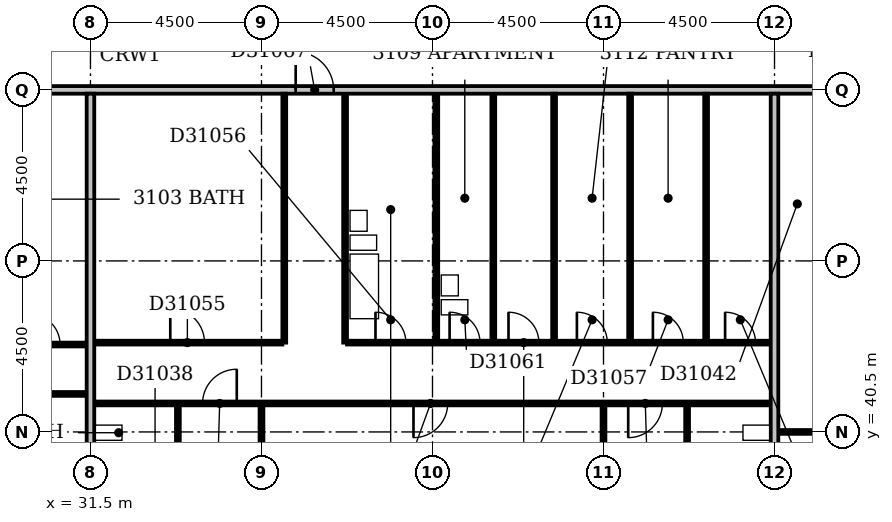
"""IFC4 building model, lengths in metres.
Left out: names, types, materials, properties, quantities, classifications, styles, units other than length and angle.
Written with IfcOpenShell. Run it as: python <this file> out.ifc"""

import sys

from ifc_helpers import new_model, si_unit, direction, frame, frame_2d, origin, place, context, subcontext, project, spatial, rectangle, extrude, element, fill, save


model = new_model("IFC4")
c1 = context("Model", 3, precision=1e-05, world=origin(), true_north=direction((0.0, 1.0)))
c2 = subcontext(c1, "Body", "Model", "MODEL_VIEW")
j1 = project(units=[si_unit("LENGTHUNIT", "METRE"), si_unit("PLANEANGLEUNIT", "RADIAN")], contexts=[c1])
p1 = place(None, origin())
s1 = spatial("IfcSite", under=j1, at=p1, CompositionType="ELEMENT")
p2 = place(p1, origin())
s2 = spatial("IfcBuilding", under=s1, at=p2, CompositionType="ELEMENT")
p3 = place(p2, frame((0.0, 0.0, 126.8)))
s3 = spatial("IfcBuildingStorey", under=s2, at=p3, CompositionType="ELEMENT", Elevation=126.8)
p4 = place(p3, frame((31.5, 36.5, 0.0), z_axis=(0.0, 0.0, 1.0), x_axis=(0.0, 1.0, 0.0)))
e1 = element("IfcWall", 1, at=p4, inside=s3, PredefinedType="PARTITIONING", context=c2, shape_type="SweptSolid", body=[
    extrude(rectangle(XDim=12.9, YDim=0.2, at=frame_2d((6.45, 0.0))), origin(), (0.0, 0.0, 1.0), 3.3),
])
p5 = place(p3, frame((36.0, 36.5, 0.0), z_axis=(0.0, 0.0, 1.0), x_axis=(0.0, 1.0, 0.0)))
e2 = element("IfcWall", 2, at=p5, inside=s3, PredefinedType="PARTITIONING", context=c2, shape_type="SweptSolid", body=[
    extrude(rectangle(XDim=4.7, YDim=0.1, at=frame_2d((2.35, 0.0))), origin(), (0.0, 0.0, 1.0), 2.4),
])
p6 = place(p3, frame((45.0, 36.5, 0.0), z_axis=(0.0, 0.0, 1.0), x_axis=(0.0, 1.0, 0.0)))
e3 = element("IfcWall", 3, at=p6, inside=s3, PredefinedType="PARTITIONING", context=c2, shape_type="SweptSolid", body=[
    extrude(rectangle(XDim=4.7, YDim=0.1, at=frame_2d((2.35, 0.0))), origin(), (0.0, 0.0, 1.0), 2.6),
])
p7 = place(p3, frame((49.5, 36.5, 0.0), z_axis=(0.0, 0.0, 1.0), x_axis=(0.0, 1.0, 0.0)))
e4 = element("IfcWall", 4, at=p7, inside=s3, PredefinedType="PARTITIONING", context=c2, shape_type="SweptSolid", body=[
    extrude(rectangle(XDim=12.9, YDim=0.2, at=frame_2d((6.45, 0.0))), origin(), (0.0, 0.0, 1.0), 3.3),
])
p8 = place(p3, frame((33.8, 38.35, 0.0), z_axis=(0.0, 0.0, 1.0), x_axis=(0.0, 1.0, 0.0)))
e5 = element("IfcWall", 5, at=p8, inside=s3, PredefinedType="PLUMBINGWALL", context=c2, shape_type="SweptSolid", body=[
    extrude(rectangle(XDim=2.85, YDim=0.1, at=frame_2d((1.425, 0.0))), origin(), (0.0, 0.0, 1.0), 3.3),
])
p9 = place(p8, frame((1.05, 0.0, 0.0)))
e6 = element("IfcOpeningElement", 6, at=p9, cuts=e5, PredefinedType="OPENING", context=c2, shape_type="SweptSolid", body=[
    extrude(rectangle(XDim=0.8, YDim=2.1, at=frame_2d((0.4, 1.05))), frame((0.0, 0.062, 0.0), z_axis=(0.0, -1.0, 0.0), x_axis=(1.0, 0.0, 0.0)), (0.0, 0.0, 1.0), 0.124),
])
p10 = place(p3, frame((47.2, 38.35, 0.0), z_axis=(0.0, 0.0, 1.0), x_axis=(0.0, 1.0, 0.0)))
e7 = element("IfcWall", 7, at=p10, inside=s3, PredefinedType="PLUMBINGWALL", context=c2, shape_type="SweptSolid", body=[
    extrude(rectangle(XDim=2.85, YDim=0.1, at=frame_2d((1.425, 0.0))), origin(), (0.0, 0.0, 1.0), 3.3),
])
p11 = place(p10, frame((1.05, 0.0, 0.0)))
e8 = element("IfcOpeningElement", 8, at=p11, cuts=e7, PredefinedType="OPENING", context=c2, shape_type="SweptSolid", body=[
    extrude(rectangle(XDim=0.8, YDim=2.1, at=frame_2d((0.4, 1.05))), frame((0.0, 0.062, 0.0), z_axis=(0.0, -1.0, 0.0), x_axis=(1.0, 0.0, 0.0)), (0.0, 0.0, 1.0), 0.124),
])
p12 = place(p3, frame((49.6, 40.5, 0.0), z_axis=(0.0, 0.0, 1.0), x_axis=(1.0, 0.0, 0.0)))
e9 = element("IfcWall", 9, at=p12, inside=s3, PredefinedType="PARTITIONING", context=c2, shape_type="SweptSolid", body=[
    extrude(rectangle(XDim=4.3, YDim=0.1, at=frame_2d((2.15, 0.0))), origin(), (0.0, 0.0, 1.0), 3.3),
])
p13 = place(p12, frame((1.7, 0.0, 0.0)))
e10 = element("IfcOpeningElement", 10, at=p13, cuts=e9, PredefinedType="OPENING", context=c2, shape_type="SweptSolid", body=[
    extrude(rectangle(XDim=0.9, YDim=2.1, at=frame_2d((0.45, 1.05))), frame((0.0, 0.062, 0.0), z_axis=(0.0, -1.0, 0.0), x_axis=(1.0, 0.0, 0.0)), (0.0, 0.0, 1.0), 0.124),
])
p14 = place(p3, frame((31.6, 41.25, 0.0), z_axis=(0.0, 0.0, 1.0), x_axis=(1.0, 0.0, 0.0)))
e11 = element("IfcWall", 11, at=p14, inside=s3, PredefinedType="PARTITIONING", context=c2, shape_type="SweptSolid", body=[
    extrude(rectangle(XDim=17.8, YDim=0.1, at=frame_2d((8.9, 0.0))), origin(), (0.0, 0.0, 1.0), 3.3),
])
p15 = place(p14, frame((2.85, 0.0, 0.0)))
e12 = element("IfcOpeningElement", 12, at=p15, cuts=e11, PredefinedType="OPENING", context=c2, shape_type="SweptSolid", body=[
    extrude(rectangle(XDim=0.9, YDim=2.1, at=frame_2d((0.45, 1.05))), frame((0.0, 0.062, 0.0), z_axis=(0.0, -1.0, 0.0), x_axis=(1.0, 0.0, 0.0)), (0.0, 0.0, 1.0), 0.124),
])
p16 = place(p14, frame((8.4, 0.0, 0.0)))
e13 = element("IfcOpeningElement", 13, at=p16, cuts=e11, PredefinedType="OPENING", context=c2, shape_type="SweptSolid", body=[
    extrude(rectangle(XDim=0.9, YDim=2.1, at=frame_2d((0.45, 1.05))), frame((0.0, 0.062, 0.0), z_axis=(0.0, -1.0, 0.0), x_axis=(1.0, 0.0, 0.0)), (0.0, 0.0, 1.0), 0.124),
])
p17 = place(p14, frame((14.05, 0.0, 0.0)))
e14 = element("IfcOpeningElement", 14, at=p17, cuts=e11, PredefinedType="OPENING", context=c2, shape_type="SweptSolid", body=[
    extrude(rectangle(XDim=0.9, YDim=2.1, at=frame_2d((0.45, 1.05))), frame((0.0, 0.062, 0.0), z_axis=(0.0, -1.0, 0.0), x_axis=(1.0, 0.0, 0.0)), (0.0, 0.0, 1.0), 0.124),
])
p18 = place(p3, frame((22.6, 41.5, 0.0), z_axis=(0.0, 0.0, 1.0), x_axis=(1.0, 0.0, 0.0)))
e15 = element("IfcWall", 15, at=p18, inside=s3, PredefinedType="PARTITIONING", context=c2, shape_type="SweptSolid", body=[
    extrude(rectangle(XDim=8.8, YDim=0.1, at=frame_2d((4.4, 0.0))), origin(), (0.0, 0.0, 1.0), 3.3),
])
p19 = place(p18, frame((1.7, 0.0, 0.0)))
e16 = element("IfcOpeningElement", 16, at=p19, cuts=e15, PredefinedType="OPENING", context=c2, shape_type="SweptSolid", body=[
    extrude(rectangle(XDim=0.9, YDim=2.1, at=frame_2d((0.45, 1.05))), frame((0.0, 0.062, 0.0), z_axis=(0.0, -1.0, 0.0), x_axis=(1.0, 0.0, 0.0)), (0.0, 0.0, 1.0), 0.124),
])
p20 = place(p18, frame((6.2, 0.0, 0.0)))
e17 = element("IfcOpeningElement", 17, at=p20, cuts=e15, PredefinedType="OPENING", context=c2, shape_type="SweptSolid", body=[
    extrude(rectangle(XDim=0.9, YDim=2.1, at=frame_2d((0.45, 1.05))), frame((0.0, 0.062, 0.0), z_axis=(0.0, -1.0, 0.0), x_axis=(1.0, 0.0, 0.0)), (0.0, 0.0, 1.0), 0.124),
])
p21 = place(p3, frame((24.15, 42.8, 0.0), z_axis=(0.0, 0.0, 1.0), x_axis=(1.0, 0.0, 0.0)))
e18 = element("IfcWall", 18, at=p21, inside=s3, PredefinedType="PARTITIONING", context=c2, shape_type="SweptSolid", body=[
    extrude(rectangle(XDim=7.25, YDim=0.1, at=frame_2d((3.625, 0.0))), origin(), (0.0, 0.0, 1.0), 3.3),
])
p22 = place(p21, frame((5.75, 0.0, 0.0)))
e19 = element("IfcOpeningElement", 19, at=p22, cuts=e18, PredefinedType="OPENING", context=c2, shape_type="SweptSolid", body=[
    extrude(rectangle(XDim=0.8, YDim=2.1, at=frame_2d((0.4, 1.05))), frame((0.0, 0.062, 0.0), z_axis=(0.0, -1.0, 0.0), x_axis=(1.0, 0.0, 0.0)), (0.0, 0.0, 1.0), 0.124),
])
p23 = place(p21, frame((2.0, 0.0, 0.0)))
e20 = element("IfcOpeningElement", 20, at=p23, cuts=e18, PredefinedType="OPENING", context=c2, shape_type="SweptSolid", body=[
    extrude(rectangle(XDim=0.9, YDim=2.1, at=frame_2d((0.45, 1.05))), frame((0.0, 0.062, 0.0), z_axis=(0.0, -1.0, 0.0), x_axis=(1.0, 0.0, 0.0)), (0.0, 0.0, 1.0), 0.124),
])
p24 = place(p3, frame((31.6, 42.85, 0.0), z_axis=(0.0, 0.0, 1.0), x_axis=(1.0, 0.0, 0.0)))
e21 = element("IfcWall", 21, at=p24, inside=s3, PredefinedType="PARTITIONING", context=c2, shape_type="SweptSolid", body=[
    extrude(rectangle(XDim=4.95, YDim=0.1, at=frame_2d((2.475, 0.0))), origin(), (0.0, 0.0, 1.0), 3.3),
])
p25 = place(p24, frame((2.0, 0.0, 0.0)))
e22 = element("IfcOpeningElement", 22, at=p25, cuts=e21, PredefinedType="OPENING", context=c2, shape_type="SweptSolid", body=[
    extrude(rectangle(XDim=0.9, YDim=2.1, at=frame_2d((0.45, 1.05))), frame((0.0, 0.062, 0.0), z_axis=(0.0, -1.0, 0.0), x_axis=(1.0, 0.0, 0.0)), (0.0, 0.0, 1.0), 0.124),
])
p26 = place(p3, frame((36.6, 42.85, 0.0), z_axis=(0.0, 0.0, 1.0), x_axis=(0.0, 1.0, 0.0)))
e23 = element("IfcWall", 23, at=p26, inside=s3, PredefinedType="PARTITIONING", context=c2, shape_type="SweptSolid", body=[
    extrude(rectangle(XDim=6.55, YDim=0.1, at=frame_2d((3.275, 0.0))), origin(), (0.0, 0.0, 1.0), 2.4),
])
p27 = place(p3, frame((38.2, 42.85, 0.0), z_axis=(0.0, 0.0, 1.0), x_axis=(0.0, 1.0, 0.0)))
e24 = element("IfcWall", 24, at=p27, inside=s3, PredefinedType="PLUMBINGWALL", context=c2, shape_type="SweptSolid", body=[
    extrude(rectangle(XDim=6.55, YDim=0.1, at=frame_2d((3.275, 0.0))), origin(), (0.0, 0.0, 1.0), 3.3),
])
p28 = place(p3, frame((38.25, 42.85, 0.0), z_axis=(0.0, 0.0, 1.0), x_axis=(1.0, 0.0, 0.0)))
e25 = element("IfcWall", 25, at=p28, inside=s3, PredefinedType="PARTITIONING", context=c2, shape_type="SweptSolid", body=[
    extrude(rectangle(XDim=11.15, YDim=0.1, at=frame_2d((5.575, 0.0))), origin(), (0.0, 0.0, 1.0), 3.3),
])
p29 = place(p28, frame((0.75, 0.0, 0.0)))
e26 = element("IfcOpeningElement", 26, at=p29, cuts=e25, PredefinedType="OPENING", context=c2, shape_type="SweptSolid", body=[
    extrude(rectangle(XDim=0.8, YDim=2.1, at=frame_2d((0.4, 1.05))), frame((0.0, 0.062, 0.0), z_axis=(0.0, -1.0, 0.0), x_axis=(1.0, 0.0, 0.0)), (0.0, 0.0, 1.0), 0.124),
])
p30 = place(p28, frame((8.05, 0.0, 0.0)))
e27 = element("IfcOpeningElement", 27, at=p30, cuts=e25, PredefinedType="OPENING", context=c2, shape_type="SweptSolid", body=[
    extrude(rectangle(XDim=0.8, YDim=2.1, at=frame_2d((0.4, 1.05))), frame((0.0, 0.062, 0.0), z_axis=(0.0, -1.0, 0.0), x_axis=(1.0, 0.0, 0.0)), (0.0, 0.0, 1.0), 0.124),
])
p31 = place(p28, frame((4.25, 0.0, 0.0)))
e28 = element("IfcOpeningElement", 28, at=p31, cuts=e25, PredefinedType="OPENING", context=c2, shape_type="SweptSolid", body=[
    extrude(rectangle(XDim=0.8, YDim=2.1, at=frame_2d((0.4, 1.05))), frame((0.0, 0.062, 0.0), z_axis=(0.0, -1.0, 0.0), x_axis=(1.0, 0.0, 0.0)), (0.0, 0.0, 1.0), 0.124),
])
p32 = place(p28, frame((6.05, 0.0, 0.0)))
e29 = element("IfcOpeningElement", 29, at=p32, cuts=e25, PredefinedType="OPENING", context=c2, shape_type="SweptSolid", body=[
    extrude(rectangle(XDim=0.8, YDim=2.1, at=frame_2d((0.4, 1.05))), frame((0.0, 0.062, 0.0), z_axis=(0.0, -1.0, 0.0), x_axis=(1.0, 0.0, 0.0)), (0.0, 0.0, 1.0), 0.124),
])
p33 = place(p28, frame((9.95, 0.0, 0.0)))
e30 = element("IfcOpeningElement", 30, at=p33, cuts=e25, PredefinedType="OPENING", context=c2, shape_type="SweptSolid", body=[
    extrude(rectangle(XDim=0.8, YDim=2.1, at=frame_2d((0.4, 1.05))), frame((0.0, 0.062, 0.0), z_axis=(0.0, -1.0, 0.0), x_axis=(1.0, 0.0, 0.0)), (0.0, 0.0, 1.0), 0.124),
])
p34 = place(p28, frame((2.7, 0.0, 0.0)))
e31 = element("IfcOpeningElement", 31, at=p34, cuts=e25, PredefinedType="OPENING", context=c2, shape_type="SweptSolid", body=[
    extrude(rectangle(XDim=0.8, YDim=2.1, at=frame_2d((0.4, 1.05))), frame((0.0, 0.062, 0.0), z_axis=(0.0, -1.0, 0.0), x_axis=(1.0, 0.0, 0.0)), (0.0, 0.0, 1.0), 0.124),
])
for number, where, z_axis, x_axis in (
    (32, (40.6, 42.9, 0.0), (0.0, 0.0, 1.0), (0.0, 1.0, 0.0)),
    (33, (42.1, 42.9, 0.0), (0.0, 0.0, 1.0), (0.0, 1.0, 0.0)),
):
    element("IfcWall", number, at=place(p3, frame(where, z_axis=z_axis, x_axis=x_axis)), inside=s3, PredefinedType="PLUMBINGWALL", context=c2, shape_type="SweptSolid", body=[
        extrude(rectangle(XDim=6.5, YDim=0.1, at=frame_2d((3.25, 0.0))), origin(), (0.0, 0.0, 1.0), 3.3),
    ])
p35 = place(p3, frame((43.7, 42.9, 0.0), z_axis=(0.0, 0.0, 1.0), x_axis=(0.0, 1.0, 0.0)))
e34 = element("IfcWall", 34, at=p35, inside=s3, PredefinedType="PARTITIONING", context=c2, shape_type="SweptSolid", body=[
    extrude(rectangle(XDim=6.5, YDim=0.1, at=frame_2d((3.25, 0.0))), origin(), (0.0, 0.0, 1.0), 3.3),
])
p36 = place(p3, frame((45.7, 42.9, 0.0), z_axis=(0.0, 0.0, 1.0), x_axis=(0.0, 1.0, 0.0)))
e35 = element("IfcWall", 35, at=p36, inside=s3, PredefinedType="PARTITIONING", context=c2, shape_type="SweptSolid", body=[
    extrude(rectangle(XDim=6.5, YDim=0.1, at=frame_2d((3.25, 0.0))), origin(), (0.0, 0.0, 1.0), 2.6),
])
p37 = place(p3, frame((47.7, 42.9, 0.0), z_axis=(0.0, 0.0, 1.0), x_axis=(0.0, 1.0, 0.0)))
e36 = element("IfcWall", 36, at=p37, inside=s3, PredefinedType="PARTITIONING", context=c2, shape_type="SweptSolid", body=[
    extrude(rectangle(XDim=6.5, YDim=0.1, at=frame_2d((3.25, 0.0))), origin(), (0.0, 0.0, 1.0), 3.3),
])
p38 = place(p3, frame((9.1, 49.5, 0.0), z_axis=(0.0, 0.0, 1.0), x_axis=(1.0, 0.0, 0.0)))
e37 = element("IfcWall", 37, at=p38, inside=s3, PredefinedType="PARTITIONING", context=c2, shape_type="SweptSolid", body=[
    extrude(rectangle(XDim=41.55, YDim=0.2, at=frame_2d((20.775, 0.0))), origin(), (0.0, 0.0, 1.0), 3.3),
])
p39 = place(p38, frame((13.7, 0.0, 0.0)))
e38 = element("IfcOpeningElement", 38, at=p39, cuts=e37, PredefinedType="OPENING", context=c2, shape_type="SweptSolid", body=[
    extrude(rectangle(XDim=1.0, YDim=2.1, at=frame_2d((0.5, 1.05))), frame((0.0, 0.112, 0.0), z_axis=(0.0, -1.0, 0.0), x_axis=(1.0, 0.0, 0.0)), (0.0, 0.0, 1.0), 0.224),
])
p40 = place(p38, frame((27.8, 0.0, 0.0)))
e39 = element("IfcOpeningElement", 39, at=p40, cuts=e37, PredefinedType="OPENING", context=c2, shape_type="SweptSolid", body=[
    extrude(rectangle(XDim=1.0, YDim=2.1, at=frame_2d((0.5, 1.05))), frame((0.0, 0.112, 0.0), z_axis=(0.0, -1.0, 0.0), x_axis=(1.0, 0.0, 0.0)), (0.0, 0.0, 1.0), 0.224),
])
p41 = place(p38, frame((8.4, 0.0, 0.0)))
e40 = element("IfcOpeningElement", 40, at=p41, cuts=e37, PredefinedType="OPENING", context=c2, shape_type="SweptSolid", body=[
    extrude(rectangle(XDim=0.9, YDim=2.1, at=frame_2d((0.45, 1.05))), frame((0.0, 0.112, 0.0), z_axis=(0.0, -1.0, 0.0), x_axis=(1.0, 0.0, 0.0)), (0.0, 0.0, 1.0), 0.224),
])
p42 = place(p15, frame((0.9, 0.0, 0.0), z_axis=(0.0, 0.0, 1.0), x_axis=(-1.0, 0.0, 0.0)))
e41 = element("IfcDoor", 41, at=p42, inside=s3, OperationType="SINGLE_SWING_LEFT", PredefinedType="DOOR", context=c2, shape_type="SweptSolid", body=[
    extrude(rectangle(XDim=0.9, YDim=2.1, at=frame_2d((0.45, 1.05))), frame((0.0, 0.025, 0.0), z_axis=(0.0, -1.0, 0.0), x_axis=(1.0, 0.0, 0.0)), (0.0, 0.0, 1.0), 0.05),
])
fill(e12, e41)
p43 = place(p16, frame((0.9, 0.0, 0.0), z_axis=(0.0, 0.0, 1.0), x_axis=(-1.0, 0.0, 0.0)))
e42 = element("IfcDoor", 42, at=p43, inside=s3, OperationType="SINGLE_SWING_RIGHT", PredefinedType="DOOR", context=c2, shape_type="SweptSolid", body=[
    extrude(rectangle(XDim=0.9, YDim=2.1, at=frame_2d((0.45, 1.05))), frame((0.0, 0.025, 0.0), z_axis=(0.0, -1.0, 0.0), x_axis=(1.0, 0.0, 0.0)), (0.0, 0.0, 1.0), 0.05),
])
fill(e13, e42)
p44 = place(p17, frame((0.9, 0.0, 0.0), z_axis=(0.0, 0.0, 1.0), x_axis=(-1.0, 0.0, 0.0)))
e43 = element("IfcDoor", 43, at=p44, inside=s3, OperationType="SINGLE_SWING_RIGHT", PredefinedType="DOOR", context=c2, shape_type="SweptSolid", body=[
    extrude(rectangle(XDim=0.9, YDim=2.1, at=frame_2d((0.45, 1.05))), frame((0.0, 0.025, 0.0), z_axis=(0.0, -1.0, 0.0), x_axis=(1.0, 0.0, 0.0)), (0.0, 0.0, 1.0), 0.05),
])
fill(e14, e43)
p45 = place(p22, origin())
e44 = element("IfcDoor", 44, at=p45, inside=s3, OperationType="SINGLE_SWING_LEFT", PredefinedType="DOOR", context=c2, shape_type="SweptSolid", body=[
    extrude(rectangle(XDim=0.8, YDim=2.1, at=frame_2d((0.4, 1.05))), frame((0.0, 0.025, 0.0), z_axis=(0.0, -1.0, 0.0), x_axis=(1.0, 0.0, 0.0)), (0.0, 0.0, 1.0), 0.05),
])
fill(e19, e44)
p46 = place(p25, origin())
e45 = element("IfcDoor", 45, at=p46, inside=s3, OperationType="SINGLE_SWING_LEFT", PredefinedType="DOOR", context=c2, shape_type="SweptSolid", body=[
    extrude(rectangle(XDim=0.9, YDim=2.1, at=frame_2d((0.45, 1.05))), frame((0.0, 0.025, 0.0), z_axis=(0.0, -1.0, 0.0), x_axis=(1.0, 0.0, 0.0)), (0.0, 0.0, 1.0), 0.05),
])
fill(e22, e45)
p47 = place(p29, origin())
e46 = element("IfcDoor", 46, at=p47, inside=s3, OperationType="SINGLE_SWING_LEFT", PredefinedType="DOOR", context=c2, shape_type="SweptSolid", body=[
    extrude(rectangle(XDim=0.8, YDim=2.1, at=frame_2d((0.4, 1.05))), frame((0.0, 0.025, 0.0), z_axis=(0.0, -1.0, 0.0), x_axis=(1.0, 0.0, 0.0)), (0.0, 0.0, 1.0), 0.05),
])
fill(e26, e46)
p48 = place(p30, origin())
e47 = element("IfcDoor", 47, at=p48, inside=s3, OperationType="SINGLE_SWING_LEFT", PredefinedType="DOOR", context=c2, shape_type="SweptSolid", body=[
    extrude(rectangle(XDim=0.8, YDim=2.1, at=frame_2d((0.4, 1.05))), frame((0.0, 0.025, 0.0), z_axis=(0.0, -1.0, 0.0), x_axis=(1.0, 0.0, 0.0)), (0.0, 0.0, 1.0), 0.05),
])
fill(e27, e47)
p49 = place(p31, origin())
e48 = element("IfcDoor", 48, at=p49, inside=s3, OperationType="SINGLE_SWING_LEFT", PredefinedType="DOOR", context=c2, shape_type="SweptSolid", body=[
    extrude(rectangle(XDim=0.8, YDim=2.1, at=frame_2d((0.4, 1.05))), frame((0.0, 0.025, 0.0), z_axis=(0.0, -1.0, 0.0), x_axis=(1.0, 0.0, 0.0)), (0.0, 0.0, 1.0), 0.05),
])
fill(e28, e48)
p50 = place(p32, origin())
e49 = element("IfcDoor", 49, at=p50, inside=s3, OperationType="SINGLE_SWING_LEFT", PredefinedType="DOOR", context=c2, shape_type="SweptSolid", body=[
    extrude(rectangle(XDim=0.8, YDim=2.1, at=frame_2d((0.4, 1.05))), frame((0.0, 0.025, 0.0), z_axis=(0.0, -1.0, 0.0), x_axis=(1.0, 0.0, 0.0)), (0.0, 0.0, 1.0), 0.05),
])
fill(e29, e49)
p51 = place(p33, origin())
e50 = element("IfcDoor", 50, at=p51, inside=s3, OperationType="SINGLE_SWING_LEFT", PredefinedType="DOOR", context=c2, shape_type="SweptSolid", body=[
    extrude(rectangle(XDim=0.8, YDim=2.1, at=frame_2d((0.4, 1.05))), frame((0.0, 0.025, 0.0), z_axis=(0.0, -1.0, 0.0), x_axis=(1.0, 0.0, 0.0)), (0.0, 0.0, 1.0), 0.05),
])
fill(e30, e50)
p52 = place(p34, origin())
e51 = element("IfcDoor", 51, at=p52, inside=s3, OperationType="SINGLE_SWING_LEFT", PredefinedType="DOOR", context=c2, shape_type="SweptSolid", body=[
    extrude(rectangle(XDim=0.8, YDim=2.1, at=frame_2d((0.4, 1.05))), frame((0.0, 0.025, 0.0), z_axis=(0.0, -1.0, 0.0), x_axis=(1.0, 0.0, 0.0)), (0.0, 0.0, 1.0), 0.05),
])
fill(e31, e51)
p53 = place(p40, origin())
e52 = element("IfcDoor", 52, at=p53, inside=s3, OperationType="SINGLE_SWING_LEFT", PredefinedType="DOOR", context=c2, shape_type="SweptSolid", body=[
    extrude(rectangle(XDim=1.0, YDim=2.1, at=frame_2d((0.5, 1.05))), frame((0.0, 0.025, 0.0), z_axis=(0.0, -1.0, 0.0), x_axis=(1.0, 0.0, 0.0)), (0.0, 0.0, 1.0), 0.05),
])
fill(e39, e52)
save(model, sys.argv[1])
